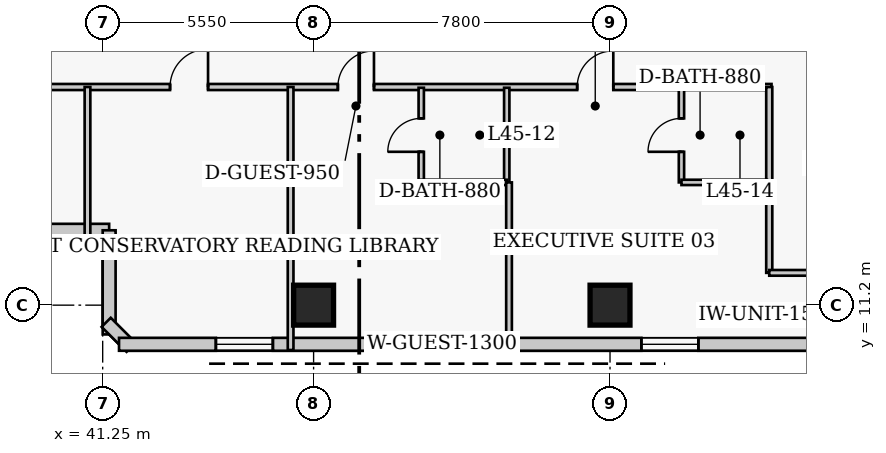
"""IFC4 building model, lengths in metres.
Left out: names, types, materials, properties, quantities, classifications, styles, units other than length and angle.
Written with IfcOpenShell. Run it as: python <this file> out.ifc"""

import sys

from ifc_helpers import new_model, si_unit, direction, frame, frame_2d, origin, origin_2d, place, context, subcontext, project, spatial, rectangle, extrude, element, fill, save


model = new_model("IFC4")
c1 = context("Model", 3, precision=1e-05, world=origin(), true_north=direction((0.0, 1.0)))
c2 = subcontext(c1, "Body", "Model", "MODEL_VIEW")
j1 = project(units=[si_unit("LENGTHUNIT", "METRE"), si_unit("PLANEANGLEUNIT", "RADIAN")], contexts=[c1])
p1 = place(None, origin())
s1 = spatial("IfcSite", under=j1, at=p1, CompositionType="ELEMENT")
p2 = place(p1, origin())
s2 = spatial("IfcBuilding", under=s1, at=p2, CompositionType="ELEMENT")
p3 = place(p2, frame((0.0, 0.0, 180.2)))
s3 = spatial("IfcBuildingStorey", under=s2, at=p3, CompositionType="ELEMENT", Elevation=180.2)
for number, where, z_axis, x_axis in (
    (1, (46.8, 11.2, 0.0), (0.0, 0.0, 1.0), (1.0, 0.0, 0.0)),
    (2, (54.6, 11.2, 0.0), (0.0, 0.0, 1.0), (1.0, 0.0, 0.0)),
):
    element("IfcColumn", number, at=place(p3, frame(where, z_axis=z_axis, x_axis=x_axis)), inside=s3, PredefinedType="COLUMN", context=c2, shape_type="SweptSolid", body=[
        extrude(rectangle(XDim=1.05, YDim=1.05, at=origin_2d()), origin(), (0.0, 0.0, 1.0), 3.8),
    ])
p4 = place(p3, frame((36.58, 13.17, 0.0), z_axis=(0.0, 0.0, 1.0), x_axis=(1.0, 0.0, 0.0)))
e3 = element("IfcWall", 3, at=p4, inside=s3, PredefinedType="SOLIDWALL", context=c2, shape_type="SweptSolid", body=[
    extrude(rectangle(XDim=4.84, YDim=0.34, at=frame_2d((2.42, 0.0))), origin(), (0.0, 0.0, 1.0), 3.42),
])
p5 = place(p4, frame((1.67, 0.0, 0.85)))
e4 = element("IfcOpeningElement", 4, at=p5, cuts=e3, PredefinedType="OPENING", context=c2, shape_type="SweptSolid", body=[
    extrude(rectangle(XDim=1.5, YDim=1.75, at=frame_2d((0.75, 0.875))), frame((0.0, 0.18, 0.0), z_axis=(0.0, -1.0, 0.0), x_axis=(1.0, 0.0, 0.0)), (0.0, 0.0, 1.0), 0.36),
])
p6 = place(p3, frame((41.42, 13.17, 0.0), z_axis=(0.0, 0.0, 1.0), x_axis=(0.0, -1.0, 0.0)))
e5 = element("IfcWall", 5, at=p6, inside=s3, PredefinedType="SOLIDWALL", context=c2, shape_type="SweptSolid", body=[
    extrude(rectangle(XDim=2.74, YDim=0.34, at=frame_2d((1.37, 0.0))), origin(), (0.0, 0.0, 1.0), 3.42),
])
p7 = place(p3, frame((41.342, 10.749, 0.0), z_axis=(0.0, 0.0, 1.0), x_axis=(0.707106781187, -0.707106781187, 0.0)))
e6 = element("IfcWall", 6, at=p7, inside=s3, PredefinedType="SOLIDWALL", context=c2, shape_type="SweptSolid", body=[
    extrude(rectangle(XDim=0.929, YDim=0.34, at=frame_2d((0.464, 0.0))), origin(), (0.0, 0.0, 1.0), 3.42),
])
p8 = place(p3, frame((41.68, 10.17, 0.0), z_axis=(0.0, 0.0, 1.0), x_axis=(1.0, 0.0, 0.0)))
e7 = element("IfcWall", 7, at=p8, inside=s3, PredefinedType="SOLIDWALL", context=c2, shape_type="SweptSolid", body=[
    extrude(rectangle(XDim=26.69, YDim=0.34, at=frame_2d((13.345, 0.0))), origin(), (0.0, 0.0, 1.0), 3.42),
])
p9 = place(p8, frame((2.548, 0.0, 0.85)))
e8 = element("IfcOpeningElement", 8, at=p9, cuts=e7, PredefinedType="OPENING", context=c2, shape_type="SweptSolid", body=[
    extrude(rectangle(XDim=1.5, YDim=1.75, at=frame_2d((0.75, 0.875))), frame((0.0, 0.18, 0.0), z_axis=(0.0, -1.0, 0.0), x_axis=(1.0, 0.0, 0.0)), (0.0, 0.0, 1.0), 0.36),
])
p10 = place(p8, frame((13.745, 0.0, 0.85)))
e9 = element("IfcOpeningElement", 9, at=p10, cuts=e7, PredefinedType="OPENING", context=c2, shape_type="SweptSolid", body=[
    extrude(rectangle(XDim=1.5, YDim=1.75, at=frame_2d((0.75, 0.875))), frame((0.0, 0.18, 0.0), z_axis=(0.0, -1.0, 0.0), x_axis=(1.0, 0.0, 0.0)), (0.0, 0.0, 1.0), 0.36),
])
p11 = place(p8, frame((21.492, 0.0, 0.85)))
e10 = element("IfcOpeningElement", 10, at=p11, cuts=e7, PredefinedType="OPENING", context=c2, shape_type="SweptSolid", body=[
    extrude(rectangle(XDim=1.5, YDim=1.75, at=frame_2d((0.75, 0.875))), frame((0.0, 0.18, 0.0), z_axis=(0.0, -1.0, 0.0), x_axis=(1.0, 0.0, 0.0)), (0.0, 0.0, 1.0), 0.36),
])
p12 = place(p8, frame((6.749, 0.0, 0.85)))
e11 = element("IfcOpeningElement", 11, at=p12, cuts=e7, PredefinedType="OPENING", context=c2, shape_type="SweptSolid", body=[
    extrude(rectangle(XDim=1.3, YDim=1.7, at=frame_2d((0.65, 0.85))), frame((0.0, 0.18, 0.0), z_axis=(0.0, -1.0, 0.0), x_axis=(1.0, 0.0, 0.0)), (0.0, 0.0, 1.0), 0.36),
])
p13 = place(p3, frame((35.8, 16.94, 0.0), z_axis=(0.0, 0.0, 1.0), x_axis=(1.0, 0.0, 0.0)))
e12 = element("IfcWall", 12, at=p13, inside=s3, PredefinedType="PARTITIONING", context=c2, shape_type="SweptSolid", body=[
    extrude(rectangle(XDim=23.05, YDim=0.16, at=frame_2d((11.525, 0.0))), origin(), (0.0, 0.0, 1.0), 3.42),
])
p14 = place(p13, frame((7.222, 0.0, 0.0)))
e13 = element("IfcOpeningElement", 13, at=p14, cuts=e12, PredefinedType="OPENING", context=c2, shape_type="SweptSolid", body=[
    extrude(rectangle(XDim=1.0, YDim=2.15, at=frame_2d((0.5, 1.075))), frame((0.0, 0.09, 0.0), z_axis=(0.0, -1.0, 0.0), x_axis=(1.0, 0.0, 0.0)), (0.0, 0.0, 1.0), 0.18),
])
p15 = place(p13, frame((11.639, 0.0, 0.0)))
e14 = element("IfcOpeningElement", 14, at=p15, cuts=e12, PredefinedType="OPENING", context=c2, shape_type="SweptSolid", body=[
    extrude(rectangle(XDim=0.95, YDim=2.1, at=frame_2d((0.475, 1.05))), frame((0.0, 0.09, 0.0), z_axis=(0.0, -1.0, 0.0), x_axis=(1.0, 0.0, 0.0)), (0.0, 0.0, 1.0), 0.18),
])
p16 = place(p13, frame((17.936, 0.0, 0.0)))
e15 = element("IfcOpeningElement", 15, at=p16, cuts=e12, PredefinedType="OPENING", context=c2, shape_type="SweptSolid", body=[
    extrude(rectangle(XDim=0.95, YDim=2.1, at=frame_2d((0.475, 1.05))), frame((0.0, 0.09, 0.0), z_axis=(0.0, -1.0, 0.0), x_axis=(1.0, 0.0, 0.0)), (0.0, 0.0, 1.0), 0.18),
])
p17 = place(p3, frame((58.79, 12.05, 0.0), z_axis=(0.0, 0.0, 1.0), x_axis=(0.0, 1.0, 0.0)))
e16 = element("IfcWall", 16, at=p17, inside=s3, PredefinedType="PARTITIONING", context=c2, shape_type="SweptSolid", body=[
    extrude(rectangle(XDim=4.89, YDim=0.16, at=frame_2d((2.445, 0.0))), origin(), (0.0, 0.0, 1.0), 3.42),
])
p18 = place(p3, frame((58.79, 12.05, 0.0), z_axis=(0.0, 0.0, 1.0), x_axis=(1.0, 0.0, 0.0)))
e17 = element("IfcWall", 17, at=p18, inside=s3, PredefinedType="PARTITIONING", context=c2, shape_type="SweptSolid", body=[
    extrude(rectangle(XDim=2.22, YDim=0.15, at=frame_2d((1.11, 0.0))), origin(), (0.0, 0.0, 1.0), 3.42),
])
p19 = place(p3, frame((40.85, 13.02, 0.0), z_axis=(0.0, 0.0, 1.0), x_axis=(0.0, 1.0, 0.0)))
e18 = element("IfcWall", 18, at=p19, inside=s3, PredefinedType="PARTITIONING", context=c2, shape_type="SweptSolid", body=[
    extrude(rectangle(XDim=3.92, YDim=0.15, at=frame_2d((1.96, 0.0))), origin(), (0.0, 0.0, 1.0), 3.42),
])
p20 = place(p3, frame((46.195, 10.02, 0.0), z_axis=(0.0, 0.0, 1.0), x_axis=(0.0, 1.0, 0.0)))
e19 = element("IfcWall", 19, at=p20, inside=s3, PredefinedType="PARTITIONING", context=c2, shape_type="SweptSolid", body=[
    extrude(rectangle(XDim=6.92, YDim=0.15, at=frame_2d((3.46, 0.0))), origin(), (0.0, 0.0, 1.0), 3.42),
])
p21 = place(p3, frame((49.633, 14.43, 0.0), z_axis=(0.0, 0.0, 1.0), x_axis=(0.0, 1.0, 0.0)))
e20 = element("IfcWall", 20, at=p21, inside=s3, PredefinedType="PLUMBINGWALL", context=c2, shape_type="SweptSolid", body=[
    extrude(rectangle(XDim=2.49, YDim=0.14, at=frame_2d((1.245, 0.0))), origin(), (0.0, 0.0, 1.0), 3.42),
])
p22 = place(p21, frame((0.805, 0.0, 0.0)))
e21 = element("IfcOpeningElement", 21, at=p22, cuts=e20, PredefinedType="OPENING", context=c2, shape_type="SweptSolid", body=[
    extrude(rectangle(XDim=0.88, YDim=2.05, at=frame_2d((0.44, 1.025))), frame((0.0, 0.08, 0.0), z_axis=(0.0, -1.0, 0.0), x_axis=(1.0, 0.0, 0.0)), (0.0, 0.0, 1.0), 0.16),
])
p23 = place(p3, frame((51.883, 14.43, 0.0), z_axis=(0.0, 0.0, 1.0), x_axis=(0.0, 1.0, 0.0)))
e22 = element("IfcWall", 22, at=p23, inside=s3, PredefinedType="PLUMBINGWALL", context=c2, shape_type="SweptSolid", body=[
    extrude(rectangle(XDim=2.49, YDim=0.14, at=frame_2d((1.245, 0.0))), origin(), (0.0, 0.0, 1.0), 3.42),
])
p24 = place(p3, frame((49.633, 14.43, 0.0), z_axis=(0.0, 0.0, 1.0), x_axis=(1.0, 0.0, 0.0)))
e23 = element("IfcWall", 23, at=p24, inside=s3, PredefinedType="PLUMBINGWALL", context=c2, shape_type="SweptSolid", body=[
    extrude(rectangle(XDim=2.25, YDim=0.14, at=frame_2d((1.125, 0.0))), origin(), (0.0, 0.0, 1.0), 3.42),
])
p25 = place(p3, frame((51.942, 10.02, 0.0), z_axis=(0.0, 0.0, 1.0), x_axis=(0.0, 1.0, 0.0)))
e24 = element("IfcWall", 24, at=p25, inside=s3, PredefinedType="PARTITIONING", context=c2, shape_type="SweptSolid", body=[
    extrude(rectangle(XDim=4.41, YDim=0.15, at=frame_2d((2.205, 0.0))), origin(), (0.0, 0.0, 1.0), 3.42),
])
p26 = place(p3, frame((56.48, 14.43, 0.0), z_axis=(0.0, 0.0, 1.0), x_axis=(0.0, 1.0, 0.0)))
e25 = element("IfcWall", 25, at=p26, inside=s3, PredefinedType="PLUMBINGWALL", context=c2, shape_type="SweptSolid", body=[
    extrude(rectangle(XDim=2.49, YDim=0.14, at=frame_2d((1.245, 0.0))), origin(), (0.0, 0.0, 1.0), 3.42),
])
p27 = place(p26, frame((0.805, 0.0, 0.0)))
e26 = element("IfcOpeningElement", 26, at=p27, cuts=e25, PredefinedType="OPENING", context=c2, shape_type="SweptSolid", body=[
    extrude(rectangle(XDim=0.88, YDim=2.05, at=frame_2d((0.44, 1.025))), frame((0.0, 0.08, 0.0), z_axis=(0.0, -1.0, 0.0), x_axis=(1.0, 0.0, 0.0)), (0.0, 0.0, 1.0), 0.16),
])
p28 = place(p3, frame((56.48, 14.43, 0.0), z_axis=(0.0, 0.0, 1.0), x_axis=(1.0, 0.0, 0.0)))
e27 = element("IfcWall", 27, at=p28, inside=s3, PredefinedType="PLUMBINGWALL", context=c2, shape_type="SweptSolid", body=[
    extrude(rectangle(XDim=2.25, YDim=0.14, at=frame_2d((1.125, 0.0))), origin(), (0.0, 0.0, 1.0), 3.42),
])
p29 = place(p9, origin())
e28 = element("IfcWindow", 28, at=p29, inside=s3, PartitioningType="SINGLE_PANEL", PredefinedType="WINDOW", context=c2, shape_type="SweptSolid", body=[
    extrude(rectangle(XDim=1.5, YDim=1.75, at=frame_2d((0.75, 0.875))), frame((0.0, 0.03, 0.0), z_axis=(0.0, -1.0, 0.0), x_axis=(1.0, 0.0, 0.0)), (0.0, 0.0, 1.0), 0.06),
])
fill(e8, e28)
p30 = place(p10, origin())
e29 = element("IfcWindow", 29, at=p30, inside=s3, PartitioningType="SINGLE_PANEL", PredefinedType="WINDOW", context=c2, shape_type="SweptSolid", body=[
    extrude(rectangle(XDim=1.5, YDim=1.75, at=frame_2d((0.75, 0.875))), frame((0.0, 0.03, 0.0), z_axis=(0.0, -1.0, 0.0), x_axis=(1.0, 0.0, 0.0)), (0.0, 0.0, 1.0), 0.06),
])
fill(e9, e29)
p31 = place(p12, origin())
e30 = element("IfcWindow", 30, at=p31, inside=s3, PartitioningType="SINGLE_PANEL", PredefinedType="WINDOW", context=c2, shape_type="SweptSolid", body=[
    extrude(rectangle(XDim=1.3, YDim=1.7, at=frame_2d((0.65, 0.85))), frame((0.0, 0.03, 0.0), z_axis=(0.0, -1.0, 0.0), x_axis=(1.0, 0.0, 0.0)), (0.0, 0.0, 1.0), 0.06),
])
fill(e11, e30)
p32 = place(p14, origin())
e31 = element("IfcDoor", 31, at=p32, inside=s3, OperationType="SINGLE_SWING_RIGHT", PredefinedType="DOOR", context=c2, shape_type="SweptSolid", body=[
    extrude(rectangle(XDim=1.0, YDim=2.15, at=frame_2d((0.5, 1.075))), frame((0.0, 0.025, 0.0), z_axis=(0.0, -1.0, 0.0), x_axis=(1.0, 0.0, 0.0)), (0.0, 0.0, 1.0), 0.05),
])
fill(e13, e31)
p33 = place(p22, origin())
e32 = element("IfcDoor", 32, at=p33, inside=s3, OperationType="SINGLE_SWING_LEFT", PredefinedType="DOOR", context=c2, shape_type="SweptSolid", body=[
    extrude(rectangle(XDim=0.88, YDim=2.05, at=frame_2d((0.44, 1.025))), frame((0.0, 0.025, 0.0), z_axis=(0.0, -1.0, 0.0), x_axis=(1.0, 0.0, 0.0)), (0.0, 0.0, 1.0), 0.05),
])
fill(e21, e32)
p34 = place(p15, origin())
e33 = element("IfcDoor", 33, at=p34, inside=s3, OperationType="SINGLE_SWING_RIGHT", PredefinedType="DOOR", context=c2, shape_type="SweptSolid", body=[
    extrude(rectangle(XDim=0.95, YDim=2.1, at=frame_2d((0.475, 1.05))), frame((0.0, 0.025, 0.0), z_axis=(0.0, -1.0, 0.0), x_axis=(1.0, 0.0, 0.0)), (0.0, 0.0, 1.0), 0.05),
])
fill(e14, e33)
p35 = place(p27, origin())
e34 = element("IfcDoor", 34, at=p35, inside=s3, OperationType="SINGLE_SWING_LEFT", PredefinedType="DOOR", context=c2, shape_type="SweptSolid", body=[
    extrude(rectangle(XDim=0.88, YDim=2.05, at=frame_2d((0.44, 1.025))), frame((0.0, 0.025, 0.0), z_axis=(0.0, -1.0, 0.0), x_axis=(1.0, 0.0, 0.0)), (0.0, 0.0, 1.0), 0.05),
])
fill(e26, e34)
p36 = place(p16, origin())
e35 = element("IfcDoor", 35, at=p36, inside=s3, OperationType="SINGLE_SWING_RIGHT", PredefinedType="DOOR", context=c2, shape_type="SweptSolid", body=[
    extrude(rectangle(XDim=0.95, YDim=2.1, at=frame_2d((0.475, 1.05))), frame((0.0, 0.025, 0.0), z_axis=(0.0, -1.0, 0.0), x_axis=(1.0, 0.0, 0.0)), (0.0, 0.0, 1.0), 0.05),
])
fill(e15, e35)
save(model, sys.argv[1])
